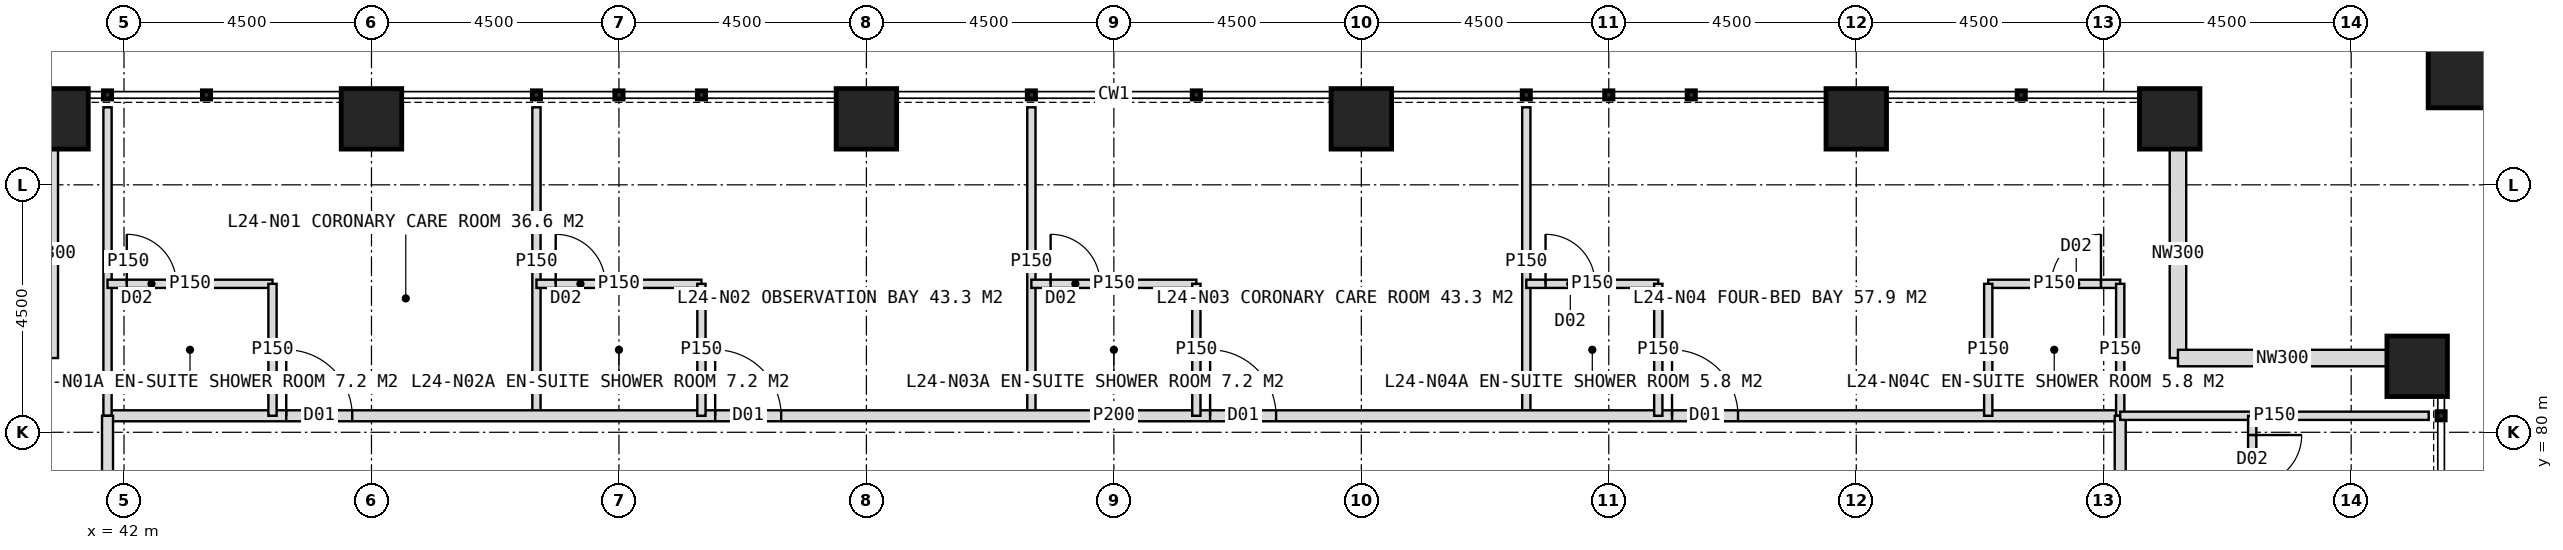
"""IFC4 building model, lengths in metres.
Left out: names, types, materials, properties, quantities, classifications, styles, units other than length and angle.
Written with IfcOpenShell. Run it as: python <this file> out.ifc"""

import sys

from ifc_helpers import new_model, si_unit, direction, frame, frame_2d, origin, origin_2d, place, context, subcontext, project, spatial, rectangle, hollow_rectangle, extrude, element, fill, save


model = new_model("IFC4")
c1 = context("Model", 3, precision=1e-05, world=origin(), true_north=direction((0.0, 1.0)))
c2 = subcontext(c1, "Body", "Model", "MODEL_VIEW")
j1 = project(units=[si_unit("LENGTHUNIT", "METRE"), si_unit("PLANEANGLEUNIT", "RADIAN")], contexts=[c1])
p1 = place(None, origin())
s1 = spatial("IfcSite", under=j1, at=p1, CompositionType="ELEMENT")
p2 = place(p1, origin())
s2 = spatial("IfcBuilding", under=s1, at=p2, CompositionType="ELEMENT")
p3 = place(p2, frame((0.0, 0.0, 104.0)))
s3 = spatial("IfcBuildingStorey", under=s2, at=p3, CompositionType="ELEMENT", Elevation=104.0)
for number, where, z_axis, x_axis in (
    (1, (40.8, 85.7, 0.0), (0.0, 0.0, 1.0), (1.0, 0.0, 0.0)),
    (2, (46.5, 85.7, 0.0), (0.0, 0.0, 1.0), (1.0, 0.0, 0.0)),
    (3, (55.5, 85.7, 0.0), (0.0, 0.0, 1.0), (1.0, 0.0, 0.0)),
    (4, (64.5, 85.7, 0.0), (0.0, 0.0, 1.0), (1.0, 0.0, 0.0)),
    (5, (73.5, 85.7, 0.0), (0.0, 0.0, 1.0), (1.0, 0.0, 0.0)),
    (6, (79.2, 85.7, 0.0), (0.0, 0.0, 1.0), (1.0, 0.0, 0.0)),
    (7, (83.7, 81.2, 0.0), (0.0, 0.0, 1.0), (1.0, 0.0, 0.0)),
):
    element("IfcColumn", number, at=place(p3, frame(where, z_axis=z_axis, x_axis=x_axis)), inside=s3, PredefinedType="COLUMN", context=c2, shape_type="SweptSolid", body=[
        extrude(hollow_rectangle(XDim=1.1, YDim=1.1, WallThickness=0.1, at=origin_2d()), origin(), (0.0, 0.0, 1.0), 4.0),
    ])
p4 = place(p3, frame((84.6, 86.6, 0.0), z_axis=(0.0, 0.0, 1.0), x_axis=(1.0, 0.0, 0.0)))
e8 = element("IfcColumn", 8, at=p4, inside=s3, PredefinedType="COLUMN", context=c2, shape_type="SweptSolid", body=[
    extrude(hollow_rectangle(XDim=1.4, YDim=1.4, WallThickness=0.08, at=origin_2d()), origin(), (0.0, 0.0, 1.0), 4.0),
])
for number, where, z_axis, x_axis in (
    (9, (79.35, 85.15, 0.0), (0.0, 0.0, 1.0), (0.0, -1.0, 0.0)),
    (10, (79.35, 81.35, 0.0), (0.0, 0.0, 1.0), (1.0, 0.0, 0.0)),
    (11, (40.65, 81.35, 0.0), (0.0, 0.0, 1.0), (0.0, 1.0, 0.0)),
):
    element("IfcWall", number, at=place(p3, frame(where, z_axis=z_axis, x_axis=x_axis)), inside=s3, PredefinedType="ELEMENTEDWALL", context=c2, shape_type="SweptSolid", body=[
        extrude(rectangle(XDim=3.8, YDim=0.3, at=frame_2d((1.9, 0.0))), origin(), (0.0, 0.0, 1.0), 4.0),
    ])
for number, where, z_axis, x_axis in (
    (12, (49.5, 80.3, 0.0), (0.0, 0.0, 1.0), (0.0, 1.0, 0.0)),
    (13, (58.5, 80.3, 0.0), (0.0, 0.0, 1.0), (0.0, 1.0, 0.0)),
    (14, (67.5, 80.3, 0.0), (0.0, 0.0, 1.0), (0.0, 1.0, 0.0)),
):
    element("IfcWall", number, at=place(p3, frame(where, z_axis=z_axis, x_axis=x_axis)), inside=s3, PredefinedType="PARTITIONING", context=c2, shape_type="SweptSolid", body=[
        extrude(rectangle(XDim=5.61, YDim=0.15, at=frame_2d((2.805, 0.0))), origin(), (0.0, 0.0, 1.0), 3.75),
    ])
p5 = place(p3, frame((41.7, 80.3, 0.0), z_axis=(0.0, 0.0, 1.0), x_axis=(1.0, 0.0, 0.0)))
e15 = element("IfcWall", 15, at=p5, inside=s3, PredefinedType="PARTITIONING", context=c2, shape_type="SweptSolid", body=[
    extrude(rectangle(XDim=36.6, YDim=0.2, at=frame_2d((18.3, 0.0))), origin(), (0.0, 0.0, 1.0), 3.75),
])
p6 = place(p5, frame((3.25, 0.0, 0.0)))
e16 = element("IfcOpeningElement", 16, at=p6, cuts=e15, PredefinedType="OPENING", context=c2, shape_type="SweptSolid", body=[
    extrude(rectangle(XDim=1.2, YDim=2.2, at=frame_2d((0.6, 1.1))), frame((0.0, 0.11, 0.0), z_axis=(0.0, -1.0, 0.0), x_axis=(1.0, 0.0, 0.0)), (0.0, 0.0, 1.0), 0.22),
])
p7 = place(p5, frame((11.05, 0.0, 0.0)))
e17 = element("IfcOpeningElement", 17, at=p7, cuts=e15, PredefinedType="OPENING", context=c2, shape_type="SweptSolid", body=[
    extrude(rectangle(XDim=1.2, YDim=2.2, at=frame_2d((0.6, 1.1))), frame((0.0, 0.11, 0.0), z_axis=(0.0, -1.0, 0.0), x_axis=(1.0, 0.0, 0.0)), (0.0, 0.0, 1.0), 0.22),
])
p8 = place(p5, frame((20.05, 0.0, 0.0)))
e18 = element("IfcOpeningElement", 18, at=p8, cuts=e15, PredefinedType="OPENING", context=c2, shape_type="SweptSolid", body=[
    extrude(rectangle(XDim=1.2, YDim=2.2, at=frame_2d((0.6, 1.1))), frame((0.0, 0.11, 0.0), z_axis=(0.0, -1.0, 0.0), x_axis=(1.0, 0.0, 0.0)), (0.0, 0.0, 1.0), 0.22),
])
p9 = place(p5, frame((28.45, 0.0, 0.0)))
e19 = element("IfcOpeningElement", 19, at=p9, cuts=e15, PredefinedType="OPENING", context=c2, shape_type="SweptSolid", body=[
    extrude(rectangle(XDim=1.2, YDim=2.2, at=frame_2d((0.6, 1.1))), frame((0.0, 0.11, 0.0), z_axis=(0.0, -1.0, 0.0), x_axis=(1.0, 0.0, 0.0)), (0.0, 0.0, 1.0), 0.22),
])
p10 = place(p3, frame((41.7, 80.3, 0.0), z_axis=(0.0, 0.0, 1.0), x_axis=(0.0, 1.0, 0.0)))
e20 = element("IfcWall", 20, at=p10, inside=s3, PredefinedType="PARTITIONING", context=c2, shape_type="SweptSolid", body=[
    extrude(rectangle(XDim=5.61, YDim=0.15, at=frame_2d((2.805, 0.0))), origin(), (0.0, 0.0, 1.0), 3.75),
])
p11 = place(p3, frame((41.7, 82.7, 0.0), z_axis=(0.0, 0.0, 1.0), x_axis=(1.0, 0.0, 0.0)))
e21 = element("IfcWall", 21, at=p11, inside=s3, PredefinedType="PARTITIONING", context=c2, shape_type="SweptSolid", body=[
    extrude(rectangle(XDim=3.0, YDim=0.15, at=frame_2d((1.5, 0.0))), origin(), (0.0, 0.0, 1.0), 3.75),
])
p12 = place(p11, frame((0.35, 0.0, 0.0)))
e22 = element("IfcOpeningElement", 22, at=p12, cuts=e21, PredefinedType="OPENING", context=c2, shape_type="SweptSolid", body=[
    extrude(rectangle(XDim=0.9, YDim=2.1, at=frame_2d((0.45, 1.05))), frame((0.0, 0.085, 0.0), z_axis=(0.0, -1.0, 0.0), x_axis=(1.0, 0.0, 0.0)), (0.0, 0.0, 1.0), 0.17),
])
p13 = place(p3, frame((44.7, 80.3, 0.0), z_axis=(0.0, 0.0, 1.0), x_axis=(0.0, 1.0, 0.0)))
e23 = element("IfcWall", 23, at=p13, inside=s3, PredefinedType="PARTITIONING", context=c2, shape_type="SweptSolid", body=[
    extrude(rectangle(XDim=2.4, YDim=0.15, at=frame_2d((1.2, 0.0))), origin(), (0.0, 0.0, 1.0), 3.75),
])
p14 = place(p3, frame((49.5, 82.7, 0.0), z_axis=(0.0, 0.0, 1.0), x_axis=(1.0, 0.0, 0.0)))
e24 = element("IfcWall", 24, at=p14, inside=s3, PredefinedType="PARTITIONING", context=c2, shape_type="SweptSolid", body=[
    extrude(rectangle(XDim=3.0, YDim=0.15, at=frame_2d((1.5, 0.0))), origin(), (0.0, 0.0, 1.0), 3.75),
])
p15 = place(p14, frame((0.35, 0.0, 0.0)))
e25 = element("IfcOpeningElement", 25, at=p15, cuts=e24, PredefinedType="OPENING", context=c2, shape_type="SweptSolid", body=[
    extrude(rectangle(XDim=0.9, YDim=2.1, at=frame_2d((0.45, 1.05))), frame((0.0, 0.085, 0.0), z_axis=(0.0, -1.0, 0.0), x_axis=(1.0, 0.0, 0.0)), (0.0, 0.0, 1.0), 0.17),
])
p16 = place(p3, frame((52.5, 80.3, 0.0), z_axis=(0.0, 0.0, 1.0), x_axis=(0.0, 1.0, 0.0)))
e26 = element("IfcWall", 26, at=p16, inside=s3, PredefinedType="PARTITIONING", context=c2, shape_type="SweptSolid", body=[
    extrude(rectangle(XDim=2.4, YDim=0.15, at=frame_2d((1.2, 0.0))), origin(), (0.0, 0.0, 1.0), 3.75),
])
p17 = place(p3, frame((58.5, 82.7, 0.0), z_axis=(0.0, 0.0, 1.0), x_axis=(1.0, 0.0, 0.0)))
e27 = element("IfcWall", 27, at=p17, inside=s3, PredefinedType="PARTITIONING", context=c2, shape_type="SweptSolid", body=[
    extrude(rectangle(XDim=3.0, YDim=0.15, at=frame_2d((1.5, 0.0))), origin(), (0.0, 0.0, 1.0), 3.75),
])
p18 = place(p17, frame((0.35, 0.0, 0.0)))
e28 = element("IfcOpeningElement", 28, at=p18, cuts=e27, PredefinedType="OPENING", context=c2, shape_type="SweptSolid", body=[
    extrude(rectangle(XDim=0.9, YDim=2.1, at=frame_2d((0.45, 1.05))), frame((0.0, 0.085, 0.0), z_axis=(0.0, -1.0, 0.0), x_axis=(1.0, 0.0, 0.0)), (0.0, 0.0, 1.0), 0.17),
])
p19 = place(p3, frame((61.5, 80.3, 0.0), z_axis=(0.0, 0.0, 1.0), x_axis=(0.0, 1.0, 0.0)))
e29 = element("IfcWall", 29, at=p19, inside=s3, PredefinedType="PARTITIONING", context=c2, shape_type="SweptSolid", body=[
    extrude(rectangle(XDim=2.4, YDim=0.15, at=frame_2d((1.2, 0.0))), origin(), (0.0, 0.0, 1.0), 3.75),
])
p20 = place(p3, frame((67.5, 82.7, 0.0), z_axis=(0.0, 0.0, 1.0), x_axis=(1.0, 0.0, 0.0)))
e30 = element("IfcWall", 30, at=p20, inside=s3, PredefinedType="PARTITIONING", context=c2, shape_type="SweptSolid", body=[
    extrude(rectangle(XDim=2.4, YDim=0.15, at=frame_2d((1.2, 0.0))), origin(), (0.0, 0.0, 1.0), 3.75),
])
p21 = place(p20, frame((0.35, 0.0, 0.0)))
e31 = element("IfcOpeningElement", 31, at=p21, cuts=e30, PredefinedType="OPENING", context=c2, shape_type="SweptSolid", body=[
    extrude(rectangle(XDim=0.9, YDim=2.1, at=frame_2d((0.45, 1.05))), frame((0.0, 0.085, 0.0), z_axis=(0.0, -1.0, 0.0), x_axis=(1.0, 0.0, 0.0)), (0.0, 0.0, 1.0), 0.17),
])
p22 = place(p3, frame((69.9, 80.3, 0.0), z_axis=(0.0, 0.0, 1.0), x_axis=(0.0, 1.0, 0.0)))
e32 = element("IfcWall", 32, at=p22, inside=s3, PredefinedType="PARTITIONING", context=c2, shape_type="SweptSolid", body=[
    extrude(rectangle(XDim=2.4, YDim=0.15, at=frame_2d((1.2, 0.0))), origin(), (0.0, 0.0, 1.0), 3.75),
])
p23 = place(p3, frame((75.9, 82.7, 0.0), z_axis=(0.0, 0.0, 1.0), x_axis=(1.0, 0.0, 0.0)))
e33 = element("IfcWall", 33, at=p23, inside=s3, PredefinedType="PARTITIONING", context=c2, shape_type="SweptSolid", body=[
    extrude(rectangle(XDim=2.4, YDim=0.15, at=frame_2d((1.2, 0.0))), origin(), (0.0, 0.0, 1.0), 3.75),
])
p24 = place(p23, frame((1.15, 0.0, 0.0)))
e34 = element("IfcOpeningElement", 34, at=p24, cuts=e33, PredefinedType="OPENING", context=c2, shape_type="SweptSolid", body=[
    extrude(rectangle(XDim=0.9, YDim=2.1, at=frame_2d((0.45, 1.05))), frame((0.0, 0.085, 0.0), z_axis=(0.0, -1.0, 0.0), x_axis=(1.0, 0.0, 0.0)), (0.0, 0.0, 1.0), 0.17),
])
for number, where, z_axis, x_axis in (
    (35, (75.9, 80.3, 0.0), (0.0, 0.0, 1.0), (0.0, 1.0, 0.0)),
    (36, (78.3, 80.3, 0.0), (0.0, 0.0, 1.0), (0.0, 1.0, 0.0)),
):
    element("IfcWall", number, at=place(p3, frame(where, z_axis=z_axis, x_axis=x_axis)), inside=s3, PredefinedType="PARTITIONING", context=c2, shape_type="SweptSolid", body=[
        extrude(rectangle(XDim=2.4, YDim=0.15, at=frame_2d((1.2, 0.0))), origin(), (0.0, 0.0, 1.0), 3.75),
    ])
p25 = place(p3, frame((41.7, 43.7, 0.0), z_axis=(0.0, 0.0, 1.0), x_axis=(0.0, 1.0, 0.0)))
e37 = element("IfcWall", 37, at=p25, inside=s3, PredefinedType="PARTITIONING", context=c2, shape_type="SweptSolid", body=[
    extrude(rectangle(XDim=36.6, YDim=0.2, at=frame_2d((18.3, 0.0))), origin(), (0.0, 0.0, 1.0), 3.75),
])
p26 = place(p25, frame((3.25, 0.0, 0.0)))
e38 = element("IfcOpeningElement", 38, at=p26, cuts=e37, PredefinedType="OPENING", context=c2, shape_type="SweptSolid", body=[
    extrude(rectangle(XDim=1.2, YDim=2.2, at=frame_2d((0.6, 1.1))), frame((0.0, 0.11, 0.0), z_axis=(0.0, -1.0, 0.0), x_axis=(1.0, 0.0, 0.0)), (0.0, 0.0, 1.0), 0.22),
])
p27 = place(p25, frame((11.05, 0.0, 0.0)))
e39 = element("IfcOpeningElement", 39, at=p27, cuts=e37, PredefinedType="OPENING", context=c2, shape_type="SweptSolid", body=[
    extrude(rectangle(XDim=1.2, YDim=2.2, at=frame_2d((0.6, 1.1))), frame((0.0, 0.11, 0.0), z_axis=(0.0, -1.0, 0.0), x_axis=(1.0, 0.0, 0.0)), (0.0, 0.0, 1.0), 0.22),
])
p28 = place(p25, frame((21.55, 0.0, 0.0)))
e40 = element("IfcOpeningElement", 40, at=p28, cuts=e37, PredefinedType="OPENING", context=c2, shape_type="SweptSolid", body=[
    extrude(rectangle(XDim=1.2, YDim=2.2, at=frame_2d((0.6, 1.1))), frame((0.0, 0.11, 0.0), z_axis=(0.0, -1.0, 0.0), x_axis=(1.0, 0.0, 0.0)), (0.0, 0.0, 1.0), 0.22),
])
p29 = place(p25, frame((32.05, 0.0, 0.0)))
e41 = element("IfcOpeningElement", 41, at=p29, cuts=e37, PredefinedType="OPENING", context=c2, shape_type="SweptSolid", body=[
    extrude(rectangle(XDim=1.2, YDim=2.2, at=frame_2d((0.6, 1.1))), frame((0.0, 0.11, 0.0), z_axis=(0.0, -1.0, 0.0), x_axis=(1.0, 0.0, 0.0)), (0.0, 0.0, 1.0), 0.22),
])
p30 = place(p3, frame((78.3, 80.3, 0.0), z_axis=(0.0, 0.0, 1.0), x_axis=(0.0, -1.0, 0.0)))
e42 = element("IfcWall", 42, at=p30, inside=s3, PredefinedType="PARTITIONING", context=c2, shape_type="SweptSolid", body=[
    extrude(rectangle(XDim=36.6, YDim=0.2, at=frame_2d((18.3, 0.0))), origin(), (0.0, 0.0, 1.0), 3.75),
])
p31 = place(p30, frame((3.25, 0.0, 0.0)))
e43 = element("IfcOpeningElement", 43, at=p31, cuts=e42, PredefinedType="OPENING", context=c2, shape_type="SweptSolid", body=[
    extrude(rectangle(XDim=1.2, YDim=2.2, at=frame_2d((0.6, 1.1))), frame((0.0, 0.11, 0.0), z_axis=(0.0, -1.0, 0.0), x_axis=(1.0, 0.0, 0.0)), (0.0, 0.0, 1.0), 0.22),
])
p32 = place(p30, frame((11.05, 0.0, 0.0)))
e44 = element("IfcOpeningElement", 44, at=p32, cuts=e42, PredefinedType="OPENING", context=c2, shape_type="SweptSolid", body=[
    extrude(rectangle(XDim=1.2, YDim=2.2, at=frame_2d((0.6, 1.1))), frame((0.0, 0.11, 0.0), z_axis=(0.0, -1.0, 0.0), x_axis=(1.0, 0.0, 0.0)), (0.0, 0.0, 1.0), 0.22),
])
p33 = place(p30, frame((21.55, 0.0, 0.0)))
e45 = element("IfcOpeningElement", 45, at=p33, cuts=e42, PredefinedType="OPENING", context=c2, shape_type="SweptSolid", body=[
    extrude(rectangle(XDim=1.2, YDim=2.2, at=frame_2d((0.6, 1.1))), frame((0.0, 0.11, 0.0), z_axis=(0.0, -1.0, 0.0), x_axis=(1.0, 0.0, 0.0)), (0.0, 0.0, 1.0), 0.22),
])
p34 = place(p30, frame((32.05, 0.0, 0.0)))
e46 = element("IfcOpeningElement", 46, at=p34, cuts=e42, PredefinedType="OPENING", context=c2, shape_type="SweptSolid", body=[
    extrude(rectangle(XDim=1.2, YDim=2.2, at=frame_2d((0.6, 1.1))), frame((0.0, 0.11, 0.0), z_axis=(0.0, -1.0, 0.0), x_axis=(1.0, 0.0, 0.0)), (0.0, 0.0, 1.0), 0.22),
])
p35 = place(p3, frame((78.3, 80.3, 0.0), z_axis=(0.0, 0.0, 1.0), x_axis=(1.0, 0.0, 0.0)))
e47 = element("IfcWall", 47, at=p35, inside=s3, PredefinedType="PARTITIONING", context=c2, shape_type="SweptSolid", body=[
    extrude(rectangle(XDim=5.61, YDim=0.15, at=frame_2d((2.805, 0.0))), origin(), (0.0, 0.0, 1.0), 3.75),
])
p36 = place(p3, frame((80.7, 80.3, 0.0), z_axis=(0.0, 0.0, 1.0), x_axis=(0.0, -1.0, 0.0)))
e48 = element("IfcWall", 48, at=p36, inside=s3, PredefinedType="PARTITIONING", context=c2, shape_type="SweptSolid", body=[
    extrude(rectangle(XDim=3.0, YDim=0.15, at=frame_2d((1.5, 0.0))), origin(), (0.0, 0.0, 1.0), 3.75),
])
p37 = place(p36, frame((0.35, 0.0, 0.0)))
e49 = element("IfcOpeningElement", 49, at=p37, cuts=e48, PredefinedType="OPENING", context=c2, shape_type="SweptSolid", body=[
    extrude(rectangle(XDim=0.9, YDim=2.1, at=frame_2d((0.45, 1.05))), frame((0.0, 0.085, 0.0), z_axis=(0.0, -1.0, 0.0), x_axis=(1.0, 0.0, 0.0)), (0.0, 0.0, 1.0), 0.17),
])
p38 = place(p6, origin())
e50 = element("IfcDoor", 50, at=p38, inside=s3, OperationType="SINGLE_SWING_LEFT", PredefinedType="DOOR", context=c2, shape_type="SweptSolid", body=[
    extrude(rectangle(XDim=1.2, YDim=2.2, at=frame_2d((0.6, 1.1))), frame((0.0, 0.025, 0.0), z_axis=(0.0, -1.0, 0.0), x_axis=(1.0, 0.0, 0.0)), (0.0, 0.0, 1.0), 0.05),
])
fill(e16, e50)
p39 = place(p12, origin())
e51 = element("IfcDoor", 51, at=p39, inside=s3, OperationType="SINGLE_SWING_LEFT", PredefinedType="DOOR", context=c2, shape_type="SweptSolid", body=[
    extrude(rectangle(XDim=0.9, YDim=2.1, at=frame_2d((0.45, 1.05))), frame((0.0, 0.025, 0.0), z_axis=(0.0, -1.0, 0.0), x_axis=(1.0, 0.0, 0.0)), (0.0, 0.0, 1.0), 0.05),
])
fill(e22, e51)
p40 = place(p7, origin())
e52 = element("IfcDoor", 52, at=p40, inside=s3, OperationType="SINGLE_SWING_LEFT", PredefinedType="DOOR", context=c2, shape_type="SweptSolid", body=[
    extrude(rectangle(XDim=1.2, YDim=2.2, at=frame_2d((0.6, 1.1))), frame((0.0, 0.025, 0.0), z_axis=(0.0, -1.0, 0.0), x_axis=(1.0, 0.0, 0.0)), (0.0, 0.0, 1.0), 0.05),
])
fill(e17, e52)
p41 = place(p15, origin())
e53 = element("IfcDoor", 53, at=p41, inside=s3, OperationType="SINGLE_SWING_LEFT", PredefinedType="DOOR", context=c2, shape_type="SweptSolid", body=[
    extrude(rectangle(XDim=0.9, YDim=2.1, at=frame_2d((0.45, 1.05))), frame((0.0, 0.025, 0.0), z_axis=(0.0, -1.0, 0.0), x_axis=(1.0, 0.0, 0.0)), (0.0, 0.0, 1.0), 0.05),
])
fill(e25, e53)
p42 = place(p8, origin())
e54 = element("IfcDoor", 54, at=p42, inside=s3, OperationType="SINGLE_SWING_LEFT", PredefinedType="DOOR", context=c2, shape_type="SweptSolid", body=[
    extrude(rectangle(XDim=1.2, YDim=2.2, at=frame_2d((0.6, 1.1))), frame((0.0, 0.025, 0.0), z_axis=(0.0, -1.0, 0.0), x_axis=(1.0, 0.0, 0.0)), (0.0, 0.0, 1.0), 0.05),
])
fill(e18, e54)
p43 = place(p18, origin())
e55 = element("IfcDoor", 55, at=p43, inside=s3, OperationType="SINGLE_SWING_LEFT", PredefinedType="DOOR", context=c2, shape_type="SweptSolid", body=[
    extrude(rectangle(XDim=0.9, YDim=2.1, at=frame_2d((0.45, 1.05))), frame((0.0, 0.025, 0.0), z_axis=(0.0, -1.0, 0.0), x_axis=(1.0, 0.0, 0.0)), (0.0, 0.0, 1.0), 0.05),
])
fill(e28, e55)
p44 = place(p9, origin())
e56 = element("IfcDoor", 56, at=p44, inside=s3, OperationType="SINGLE_SWING_LEFT", PredefinedType="DOOR", context=c2, shape_type="SweptSolid", body=[
    extrude(rectangle(XDim=1.2, YDim=2.2, at=frame_2d((0.6, 1.1))), frame((0.0, 0.025, 0.0), z_axis=(0.0, -1.0, 0.0), x_axis=(1.0, 0.0, 0.0)), (0.0, 0.0, 1.0), 0.05),
])
fill(e19, e56)
p45 = place(p21, origin())
e57 = element("IfcDoor", 57, at=p45, inside=s3, OperationType="SINGLE_SWING_LEFT", PredefinedType="DOOR", context=c2, shape_type="SweptSolid", body=[
    extrude(rectangle(XDim=0.9, YDim=2.1, at=frame_2d((0.45, 1.05))), frame((0.0, 0.025, 0.0), z_axis=(0.0, -1.0, 0.0), x_axis=(1.0, 0.0, 0.0)), (0.0, 0.0, 1.0), 0.05),
])
fill(e31, e57)
p46 = place(p24, origin())
e58 = element("IfcDoor", 58, at=p46, inside=s3, OperationType="SINGLE_SWING_RIGHT", PredefinedType="DOOR", context=c2, shape_type="SweptSolid", body=[
    extrude(rectangle(XDim=0.9, YDim=2.1, at=frame_2d((0.45, 1.05))), frame((0.0, 0.025, 0.0), z_axis=(0.0, -1.0, 0.0), x_axis=(1.0, 0.0, 0.0)), (0.0, 0.0, 1.0), 0.05),
])
fill(e34, e58)
p47 = place(p37, origin())
e59 = element("IfcDoor", 59, at=p47, inside=s3, OperationType="SINGLE_SWING_LEFT", PredefinedType="DOOR", context=c2, shape_type="SweptSolid", body=[
    extrude(rectangle(XDim=0.9, YDim=2.1, at=frame_2d((0.45, 1.05))), frame((0.0, 0.025, 0.0), z_axis=(0.0, -1.0, 0.0), x_axis=(1.0, 0.0, 0.0)), (0.0, 0.0, 1.0), 0.05),
])
fill(e49, e59)
save(model, sys.argv[1])
